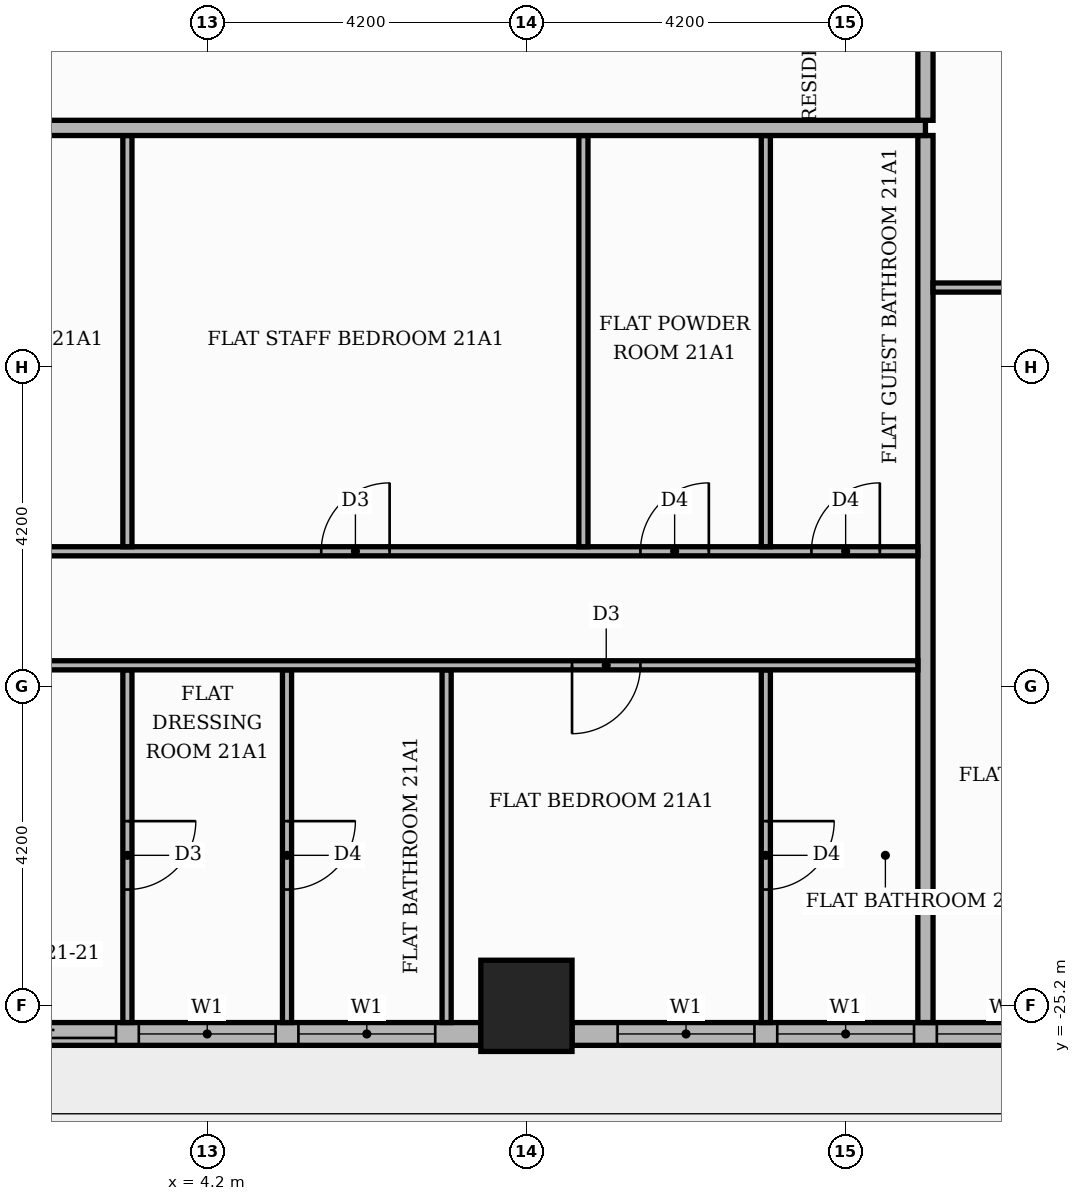
"""IFC4 building model, lengths in metres.
Left out: names, types, materials, properties, quantities, classifications, styles, units other than length and angle.
Written with IfcOpenShell. Run it as: python <this file> out.ifc"""

import sys

from ifc_helpers import new_model, si_unit, direction, frame, frame_2d, origin, origin_2d, place, context, subcontext, project, spatial, rectangle, extrude, element, fill, save


model = new_model("IFC4")
c1 = context("Model", 3, precision=1e-05, world=origin(), true_north=direction((0.0, 1.0)))
c2 = subcontext(c1, "Body", "Model", "MODEL_VIEW")
j1 = project(units=[si_unit("LENGTHUNIT", "METRE"), si_unit("PLANEANGLEUNIT", "RADIAN")], contexts=[c1])
p1 = place(None, origin())
s1 = spatial("IfcSite", under=j1, at=p1, CompositionType="ELEMENT")
p2 = place(p1, origin())
s2 = spatial("IfcBuilding", under=s1, at=p2, CompositionType="ELEMENT")
p3 = place(p2, frame((0.0, 0.0, 90.9)))
s3 = spatial("IfcBuildingStorey", under=s2, at=p3, CompositionType="ELEMENT", Elevation=90.9)
p4 = place(p3, frame((8.4, -25.2, 0.0), z_axis=(0.0, 0.0, 1.0), x_axis=(1.0, 0.0, 0.0)))
e1 = element("IfcColumn", 1, at=p4, inside=s3, PredefinedType="COLUMN", context=c2, shape_type="SweptSolid", body=[
    extrude(rectangle(XDim=1.2, YDim=1.2, at=origin_2d()), origin(), (0.0, 0.0, 1.0), 3.9),
])
p5 = place(p3, frame((0.6, -25.57, 0.0), z_axis=(0.0, 0.0, 1.0), x_axis=(1.0, 0.0, 0.0)))
e2 = element("IfcWall", 2, at=p5, inside=s3, PredefinedType="STANDARD", context=c2, shape_type="SweptSolid", body=[
    extrude(rectangle(XDim=7.2, YDim=0.3, at=frame_2d((3.6, 0.0))), origin(), (0.0, 0.0, 1.0), 3.48),
])
p6 = place(p5, frame((0.6, 0.0, 0.0)))
e3 = element("IfcOpeningElement", 3, at=p6, cuts=e2, PredefinedType="OPENING", context=c2, shape_type="SweptSolid", body=[
    extrude(rectangle(XDim=1.8, YDim=2.4, at=frame_2d((0.9, 1.2))), frame((0.0, 0.16, 0.0), z_axis=(0.0, -1.0, 0.0), x_axis=(1.0, 0.0, 0.0)), (0.0, 0.0, 1.0), 0.32),
])
p7 = place(p5, frame((2.7, 0.0, 0.9)))
e4 = element("IfcOpeningElement", 4, at=p7, cuts=e2, PredefinedType="OPENING", context=c2, shape_type="SweptSolid", body=[
    extrude(rectangle(XDim=1.8, YDim=2.1, at=frame_2d((0.9, 1.05))), frame((0.0, 0.16, 0.0), z_axis=(0.0, -1.0, 0.0), x_axis=(1.0, 0.0, 0.0)), (0.0, 0.0, 1.0), 0.32),
])
p8 = place(p5, frame((4.8, 0.0, 0.9)))
e5 = element("IfcOpeningElement", 5, at=p8, cuts=e2, PredefinedType="OPENING", context=c2, shape_type="SweptSolid", body=[
    extrude(rectangle(XDim=1.8, YDim=2.1, at=frame_2d((0.9, 1.05))), frame((0.0, 0.16, 0.0), z_axis=(0.0, -1.0, 0.0), x_axis=(1.0, 0.0, 0.0)), (0.0, 0.0, 1.0), 0.32),
])
p9 = place(p3, frame((9.0, -25.57, 0.0), z_axis=(0.0, 0.0, 1.0), x_axis=(1.0, 0.0, 0.0)))
e6 = element("IfcWall", 6, at=p9, inside=s3, PredefinedType="STANDARD", context=c2, shape_type="SweptSolid", body=[
    extrude(rectangle(XDim=7.2, YDim=0.3, at=frame_2d((3.6, 0.0))), origin(), (0.0, 0.0, 1.0), 3.48),
])
p10 = place(p9, frame((0.6, 0.0, 0.9)))
e7 = element("IfcOpeningElement", 7, at=p10, cuts=e6, PredefinedType="OPENING", context=c2, shape_type="SweptSolid", body=[
    extrude(rectangle(XDim=1.8, YDim=2.1, at=frame_2d((0.9, 1.05))), frame((0.0, 0.16, 0.0), z_axis=(0.0, -1.0, 0.0), x_axis=(1.0, 0.0, 0.0)), (0.0, 0.0, 1.0), 0.32),
])
p11 = place(p9, frame((2.7, 0.0, 0.9)))
e8 = element("IfcOpeningElement", 8, at=p11, cuts=e6, PredefinedType="OPENING", context=c2, shape_type="SweptSolid", body=[
    extrude(rectangle(XDim=1.8, YDim=2.1, at=frame_2d((0.9, 1.05))), frame((0.0, 0.16, 0.0), z_axis=(0.0, -1.0, 0.0), x_axis=(1.0, 0.0, 0.0)), (0.0, 0.0, 1.0), 0.32),
])
p12 = place(p9, frame((4.8, 0.0, 0.9)))
e9 = element("IfcOpeningElement", 9, at=p12, cuts=e6, PredefinedType="OPENING", context=c2, shape_type="SweptSolid", body=[
    extrude(rectangle(XDim=1.8, YDim=2.1, at=frame_2d((0.9, 1.05))), frame((0.0, 0.16, 0.0), z_axis=(0.0, -1.0, 0.0), x_axis=(1.0, 0.0, 0.0)), (0.0, 0.0, 1.0), 0.32),
])
p13 = place(p3, frame((3.15, -25.42, 0.0), z_axis=(0.0, 0.0, 1.0), x_axis=(0.0, 1.0, 0.0)))
e10 = element("IfcWall", 10, at=p13, inside=s3, PredefinedType="PARTITIONING", context=c2, shape_type="SweptSolid", body=[
    extrude(rectangle(XDim=4.64, YDim=0.12, at=frame_2d((2.32, 0.0))), origin(), (0.0, 0.0, 1.0), 3.48),
])
p14 = place(p13, frame((1.75, 0.0, 0.0)))
e11 = element("IfcOpeningElement", 11, at=p14, cuts=e10, PredefinedType="OPENING", context=c2, shape_type="SweptSolid", body=[
    extrude(rectangle(XDim=0.9, YDim=2.1, at=frame_2d((0.45, 1.05))), frame((0.0, 0.07, 0.0), z_axis=(0.0, -1.0, 0.0), x_axis=(1.0, 0.0, 0.0)), (0.0, 0.0, 1.0), 0.14),
])
p15 = place(p3, frame((5.25, -25.42, 0.0), z_axis=(0.0, 0.0, 1.0), x_axis=(0.0, 1.0, 0.0)))
e12 = element("IfcWall", 12, at=p15, inside=s3, PredefinedType="PARTITIONING", context=c2, shape_type="SweptSolid", body=[
    extrude(rectangle(XDim=4.64, YDim=0.12, at=frame_2d((2.32, 0.0))), origin(), (0.0, 0.0, 1.0), 3.48),
])
p16 = place(p15, frame((1.75, 0.0, 0.0)))
e13 = element("IfcOpeningElement", 13, at=p16, cuts=e12, PredefinedType="OPENING", context=c2, shape_type="SweptSolid", body=[
    extrude(rectangle(XDim=0.9, YDim=2.1, at=frame_2d((0.45, 1.05))), frame((0.0, 0.07, 0.0), z_axis=(0.0, -1.0, 0.0), x_axis=(1.0, 0.0, 0.0)), (0.0, 0.0, 1.0), 0.14),
])
p17 = place(p3, frame((7.35, -25.42, 0.0), z_axis=(0.0, 0.0, 1.0), x_axis=(0.0, 1.0, 0.0)))
e14 = element("IfcWall", 14, at=p17, inside=s3, PredefinedType="PARTITIONING", context=c2, shape_type="SweptSolid", body=[
    extrude(rectangle(XDim=4.64, YDim=0.12, at=frame_2d((2.32, 0.0))), origin(), (0.0, 0.0, 1.0), 3.48),
])
p18 = place(p3, frame((11.55, -25.42, 0.0), z_axis=(0.0, 0.0, 1.0), x_axis=(0.0, 1.0, 0.0)))
e15 = element("IfcWall", 15, at=p18, inside=s3, PredefinedType="PARTITIONING", context=c2, shape_type="SweptSolid", body=[
    extrude(rectangle(XDim=4.64, YDim=0.12, at=frame_2d((2.32, 0.0))), origin(), (0.0, 0.0, 1.0), 3.48),
])
p19 = place(p18, frame((1.75, 0.0, 0.0)))
e16 = element("IfcOpeningElement", 16, at=p19, cuts=e15, PredefinedType="OPENING", context=c2, shape_type="SweptSolid", body=[
    extrude(rectangle(XDim=0.9, YDim=2.1, at=frame_2d((0.45, 1.05))), frame((0.0, 0.07, 0.0), z_axis=(0.0, -1.0, 0.0), x_axis=(1.0, 0.0, 0.0)), (0.0, 0.0, 1.0), 0.14),
])
p20 = place(p3, frame((13.65, -25.42, 0.0), z_axis=(0.0, 0.0, 1.0), x_axis=(0.0, 1.0, 0.0)))
e17 = element("IfcWall", 17, at=p20, inside=s3, PredefinedType="PARTITIONING", context=c2, shape_type="SweptSolid", body=[
    extrude(rectangle(XDim=11.67, YDim=0.2, at=frame_2d((5.835, 0.0))), origin(), (0.0, 0.0, 1.0), 3.48),
])
p21 = place(p3, frame((-25.42, -20.72, 0.0), z_axis=(0.0, 0.0, 1.0), x_axis=(1.0, 0.0, 0.0)))
e18 = element("IfcWall", 18, at=p21, inside=s3, PredefinedType="PARTITIONING", context=c2, shape_type="SweptSolid", body=[
    extrude(rectangle(XDim=38.97, YDim=0.12, at=frame_2d((19.485, 0.0))), origin(), (0.0, 0.0, 1.0), 3.48),
])
p22 = place(p21, frame((12.32, 0.0, 0.0)))
e19 = element("IfcOpeningElement", 19, at=p22, cuts=e18, PredefinedType="OPENING", context=c2, shape_type="SweptSolid", body=[
    extrude(rectangle(XDim=1.0, YDim=2.1, at=frame_2d((0.5, 1.05))), frame((0.0, 0.07, 0.0), z_axis=(0.0, -1.0, 0.0), x_axis=(1.0, 0.0, 0.0)), (0.0, 0.0, 1.0), 0.14),
])
p23 = place(p21, frame((16.52, 0.0, 0.0)))
e20 = element("IfcOpeningElement", 20, at=p23, cuts=e18, PredefinedType="OPENING", context=c2, shape_type="SweptSolid", body=[
    extrude(rectangle(XDim=1.0, YDim=2.1, at=frame_2d((0.5, 1.05))), frame((0.0, 0.07, 0.0), z_axis=(0.0, -1.0, 0.0), x_axis=(1.0, 0.0, 0.0)), (0.0, 0.0, 1.0), 0.14),
])
p24 = place(p21, frame((23.92, 0.0, 0.0)))
e21 = element("IfcOpeningElement", 21, at=p24, cuts=e18, PredefinedType="OPENING", context=c2, shape_type="SweptSolid", body=[
    extrude(rectangle(XDim=0.9, YDim=2.1, at=frame_2d((0.45, 1.05))), frame((0.0, 0.07, 0.0), z_axis=(0.0, -1.0, 0.0), x_axis=(1.0, 0.0, 0.0)), (0.0, 0.0, 1.0), 0.14),
])
p25 = place(p21, frame((34.42, 0.0, 0.0)))
e22 = element("IfcOpeningElement", 22, at=p25, cuts=e18, PredefinedType="OPENING", context=c2, shape_type="SweptSolid", body=[
    extrude(rectangle(XDim=0.9, YDim=2.1, at=frame_2d((0.45, 1.05))), frame((0.0, 0.07, 0.0), z_axis=(0.0, -1.0, 0.0), x_axis=(1.0, 0.0, 0.0)), (0.0, 0.0, 1.0), 0.14),
])
p26 = place(p3, frame((-7.35, -19.22, 0.0), z_axis=(0.0, 0.0, 1.0), x_axis=(1.0, 0.0, 0.0)))
e23 = element("IfcWall", 23, at=p26, inside=s3, PredefinedType="PARTITIONING", context=c2, shape_type="SweptSolid", body=[
    extrude(rectangle(XDim=20.9, YDim=0.12, at=frame_2d((10.45, 0.0))), origin(), (0.0, 0.0, 1.0), 3.48),
])
p27 = place(p26, frame((2.7, 0.0, 0.0)))
e24 = element("IfcOpeningElement", 24, at=p27, cuts=e23, PredefinedType="OPENING", context=c2, shape_type="SweptSolid", body=[
    extrude(rectangle(XDim=0.9, YDim=2.1, at=frame_2d((0.45, 1.05))), frame((0.0, 0.07, 0.0), z_axis=(0.0, -1.0, 0.0), x_axis=(1.0, 0.0, 0.0)), (0.0, 0.0, 1.0), 0.14),
])
p28 = place(p26, frame((7.95, 0.0, 0.0)))
e25 = element("IfcOpeningElement", 25, at=p28, cuts=e23, PredefinedType="OPENING", context=c2, shape_type="SweptSolid", body=[
    extrude(rectangle(XDim=0.9, YDim=2.1, at=frame_2d((0.45, 1.05))), frame((0.0, 0.07, 0.0), z_axis=(0.0, -1.0, 0.0), x_axis=(1.0, 0.0, 0.0)), (0.0, 0.0, 1.0), 0.14),
])
p29 = place(p26, frame((13.05, 0.0, 0.0)))
e26 = element("IfcOpeningElement", 26, at=p29, cuts=e23, PredefinedType="OPENING", context=c2, shape_type="SweptSolid", body=[
    extrude(rectangle(XDim=0.9, YDim=2.1, at=frame_2d((0.45, 1.05))), frame((0.0, 0.07, 0.0), z_axis=(0.0, -1.0, 0.0), x_axis=(1.0, 0.0, 0.0)), (0.0, 0.0, 1.0), 0.14),
])
p30 = place(p26, frame((17.25, 0.0, 0.0)))
e27 = element("IfcOpeningElement", 27, at=p30, cuts=e23, PredefinedType="OPENING", context=c2, shape_type="SweptSolid", body=[
    extrude(rectangle(XDim=0.9, YDim=2.1, at=frame_2d((0.45, 1.05))), frame((0.0, 0.07, 0.0), z_axis=(0.0, -1.0, 0.0), x_axis=(1.0, 0.0, 0.0)), (0.0, 0.0, 1.0), 0.14),
])
p31 = place(p26, frame((19.5, 0.0, 0.0)))
e28 = element("IfcOpeningElement", 28, at=p31, cuts=e23, PredefinedType="OPENING", context=c2, shape_type="SweptSolid", body=[
    extrude(rectangle(XDim=0.9, YDim=2.1, at=frame_2d((0.45, 1.05))), frame((0.0, 0.07, 0.0), z_axis=(0.0, -1.0, 0.0), x_axis=(1.0, 0.0, 0.0)), (0.0, 0.0, 1.0), 0.14),
])
for number, where, z_axis, x_axis in (
    (29, (3.15, -19.16, 0.0), (0.0, 0.0, 1.0), (0.0, 1.0, 0.0)),
    (30, (9.15, -19.16, 0.0), (0.0, 0.0, 1.0), (0.0, 1.0, 0.0)),
    (31, (11.55, -19.16, 0.0), (0.0, 0.0, 1.0), (0.0, 1.0, 0.0)),
):
    element("IfcWall", number, at=place(p3, frame(where, z_axis=z_axis, x_axis=x_axis)), inside=s3, PredefinedType="PARTITIONING", context=c2, shape_type="SweptSolid", body=[
        extrude(rectangle(XDim=5.41, YDim=0.12, at=frame_2d((2.705, 0.0))), origin(), (0.0, 0.0, 1.0), 3.48),
    ])
p32 = place(p3, frame((13.75, -15.75, 0.0), z_axis=(0.0, 0.0, 1.0), x_axis=(1.0, 0.0, 0.0)))
e32 = element("IfcWall", 32, at=p32, inside=s3, PredefinedType="PARTITIONING", context=c2, shape_type="SweptSolid", body=[
    extrude(rectangle(XDim=6.67, YDim=0.12, at=frame_2d((3.335, 0.0))), origin(), (0.0, 0.0, 1.0), 3.48),
])
p33 = place(p32, frame((2.785, 0.0, 0.0)))
e33 = element("IfcOpeningElement", 33, at=p33, cuts=e32, PredefinedType="OPENING", context=c2, shape_type="SweptSolid", body=[
    extrude(rectangle(XDim=1.0, YDim=2.1, at=frame_2d((0.5, 1.05))), frame((0.0, 0.07, 0.0), z_axis=(0.0, -1.0, 0.0), x_axis=(1.0, 0.0, 0.0)), (0.0, 0.0, 1.0), 0.14),
])
p34 = place(p3, frame((-25.42, -13.65, 0.0), z_axis=(0.0, 0.0, 1.0), x_axis=(1.0, 0.0, 0.0)))
e34 = element("IfcWall", 34, at=p34, inside=s3, PredefinedType="PARTITIONING", context=c2, shape_type="SweptSolid", body=[
    extrude(rectangle(XDim=39.07, YDim=0.2, at=frame_2d((19.535, 0.0))), origin(), (0.0, 0.0, 1.0), 3.48),
])
p35 = place(p34, frame((14.37, 0.0, 0.0)))
e35 = element("IfcOpeningElement", 35, at=p35, cuts=e34, PredefinedType="OPENING", context=c2, shape_type="SweptSolid", body=[
    extrude(rectangle(XDim=1.1, YDim=2.4, at=frame_2d((0.55, 1.2))), frame((0.0, 0.11, 0.0), z_axis=(0.0, -1.0, 0.0), x_axis=(1.0, 0.0, 0.0)), (0.0, 0.0, 1.0), 0.22),
])
p36 = place(p3, frame((13.65, -13.55, 0.0), z_axis=(0.0, 0.0, 1.0), x_axis=(0.0, 1.0, 0.0)))
e36 = element("IfcWall", 36, at=p36, inside=s3, PredefinedType="PARTITIONING", context=c2, shape_type="SweptSolid", body=[
    extrude(rectangle(XDim=8.2, YDim=0.2, at=frame_2d((4.1, 0.0))), origin(), (0.0, 0.0, 1.0), 3.48),
])
p37 = place(p36, frame((1.45, 0.0, 0.0)))
e37 = element("IfcOpeningElement", 37, at=p37, cuts=e36, PredefinedType="OPENING", context=c2, shape_type="SweptSolid", body=[
    extrude(rectangle(XDim=1.1, YDim=2.4, at=frame_2d((0.55, 1.2))), frame((0.0, 0.11, 0.0), z_axis=(0.0, -1.0, 0.0), x_axis=(1.0, 0.0, 0.0)), (0.0, 0.0, 1.0), 0.22),
])
p38 = place(p6, origin())
e38 = element("IfcDoor", 38, at=p38, inside=s3, OperationType="SLIDING_TO_LEFT", PredefinedType="DOOR", context=c2, shape_type="SweptSolid", body=[
    extrude(rectangle(XDim=1.8, YDim=2.4, at=frame_2d((0.9, 1.2))), frame((0.0, 0.025, 0.0), z_axis=(0.0, -1.0, 0.0), x_axis=(1.0, 0.0, 0.0)), (0.0, 0.0, 1.0), 0.05),
])
fill(e3, e38)
p39 = place(p7, origin())
e39 = element("IfcWindow", 39, at=p39, inside=s3, PartitioningType="SINGLE_PANEL", PredefinedType="WINDOW", context=c2, shape_type="SweptSolid", body=[
    extrude(rectangle(XDim=1.8, YDim=2.1, at=frame_2d((0.9, 1.05))), frame((0.0, 0.03, 0.0), z_axis=(0.0, -1.0, 0.0), x_axis=(1.0, 0.0, 0.0)), (0.0, 0.0, 1.0), 0.06),
])
fill(e4, e39)
p40 = place(p8, origin())
e40 = element("IfcWindow", 40, at=p40, inside=s3, PartitioningType="SINGLE_PANEL", PredefinedType="WINDOW", context=c2, shape_type="SweptSolid", body=[
    extrude(rectangle(XDim=1.8, YDim=2.1, at=frame_2d((0.9, 1.05))), frame((0.0, 0.03, 0.0), z_axis=(0.0, -1.0, 0.0), x_axis=(1.0, 0.0, 0.0)), (0.0, 0.0, 1.0), 0.06),
])
fill(e5, e40)
p41 = place(p10, origin())
e41 = element("IfcWindow", 41, at=p41, inside=s3, PartitioningType="SINGLE_PANEL", PredefinedType="WINDOW", context=c2, shape_type="SweptSolid", body=[
    extrude(rectangle(XDim=1.8, YDim=2.1, at=frame_2d((0.9, 1.05))), frame((0.0, 0.03, 0.0), z_axis=(0.0, -1.0, 0.0), x_axis=(1.0, 0.0, 0.0)), (0.0, 0.0, 1.0), 0.06),
])
fill(e7, e41)
p42 = place(p11, origin())
e42 = element("IfcWindow", 42, at=p42, inside=s3, PartitioningType="SINGLE_PANEL", PredefinedType="WINDOW", context=c2, shape_type="SweptSolid", body=[
    extrude(rectangle(XDim=1.8, YDim=2.1, at=frame_2d((0.9, 1.05))), frame((0.0, 0.03, 0.0), z_axis=(0.0, -1.0, 0.0), x_axis=(1.0, 0.0, 0.0)), (0.0, 0.0, 1.0), 0.06),
])
fill(e8, e42)
p43 = place(p12, origin())
e43 = element("IfcWindow", 43, at=p43, inside=s3, PartitioningType="SINGLE_PANEL", PredefinedType="WINDOW", context=c2, shape_type="SweptSolid", body=[
    extrude(rectangle(XDim=1.8, YDim=2.1, at=frame_2d((0.9, 1.05))), frame((0.0, 0.03, 0.0), z_axis=(0.0, -1.0, 0.0), x_axis=(1.0, 0.0, 0.0)), (0.0, 0.0, 1.0), 0.06),
])
fill(e9, e43)
p44 = place(p29, origin())
e44 = element("IfcDoor", 44, at=p44, inside=s3, OperationType="SINGLE_SWING_RIGHT", PredefinedType="DOOR", context=c2, shape_type="SweptSolid", body=[
    extrude(rectangle(XDim=0.9, YDim=2.1, at=frame_2d((0.45, 1.05))), frame((0.0, 0.025, 0.0), z_axis=(0.0, -1.0, 0.0), x_axis=(1.0, 0.0, 0.0)), (0.0, 0.0, 1.0), 0.05),
])
fill(e26, e44)
p45 = place(p30, origin())
e45 = element("IfcDoor", 45, at=p45, inside=s3, OperationType="SINGLE_SWING_RIGHT", PredefinedType="DOOR", context=c2, shape_type="SweptSolid", body=[
    extrude(rectangle(XDim=0.9, YDim=2.1, at=frame_2d((0.45, 1.05))), frame((0.0, 0.025, 0.0), z_axis=(0.0, -1.0, 0.0), x_axis=(1.0, 0.0, 0.0)), (0.0, 0.0, 1.0), 0.05),
])
fill(e27, e45)
p46 = place(p31, origin())
e46 = element("IfcDoor", 46, at=p46, inside=s3, OperationType="SINGLE_SWING_RIGHT", PredefinedType="DOOR", context=c2, shape_type="SweptSolid", body=[
    extrude(rectangle(XDim=0.9, YDim=2.1, at=frame_2d((0.45, 1.05))), frame((0.0, 0.025, 0.0), z_axis=(0.0, -1.0, 0.0), x_axis=(1.0, 0.0, 0.0)), (0.0, 0.0, 1.0), 0.05),
])
fill(e28, e46)
p47 = place(p14, frame((0.9, 0.0, 0.0), z_axis=(0.0, 0.0, 1.0), x_axis=(-1.0, 0.0, 0.0)))
e47 = element("IfcDoor", 47, at=p47, inside=s3, OperationType="SINGLE_SWING_RIGHT", PredefinedType="DOOR", context=c2, shape_type="SweptSolid", body=[
    extrude(rectangle(XDim=0.9, YDim=2.1, at=frame_2d((0.45, 1.05))), frame((0.0, 0.025, 0.0), z_axis=(0.0, -1.0, 0.0), x_axis=(1.0, 0.0, 0.0)), (0.0, 0.0, 1.0), 0.05),
])
fill(e11, e47)
p48 = place(p16, frame((0.9, 0.0, 0.0), z_axis=(0.0, 0.0, 1.0), x_axis=(-1.0, 0.0, 0.0)))
e48 = element("IfcDoor", 48, at=p48, inside=s3, OperationType="SINGLE_SWING_RIGHT", PredefinedType="DOOR", context=c2, shape_type="SweptSolid", body=[
    extrude(rectangle(XDim=0.9, YDim=2.1, at=frame_2d((0.45, 1.05))), frame((0.0, 0.025, 0.0), z_axis=(0.0, -1.0, 0.0), x_axis=(1.0, 0.0, 0.0)), (0.0, 0.0, 1.0), 0.05),
])
fill(e13, e48)
p49 = place(p25, frame((0.9, 0.0, 0.0), z_axis=(0.0, 0.0, 1.0), x_axis=(-1.0, 0.0, 0.0)))
e49 = element("IfcDoor", 49, at=p49, inside=s3, OperationType="SINGLE_SWING_LEFT", PredefinedType="DOOR", context=c2, shape_type="SweptSolid", body=[
    extrude(rectangle(XDim=0.9, YDim=2.1, at=frame_2d((0.45, 1.05))), frame((0.0, 0.025, 0.0), z_axis=(0.0, -1.0, 0.0), x_axis=(1.0, 0.0, 0.0)), (0.0, 0.0, 1.0), 0.05),
])
fill(e22, e49)
p50 = place(p19, frame((0.9, 0.0, 0.0), z_axis=(0.0, 0.0, 1.0), x_axis=(-1.0, 0.0, 0.0)))
e50 = element("IfcDoor", 50, at=p50, inside=s3, OperationType="SINGLE_SWING_RIGHT", PredefinedType="DOOR", context=c2, shape_type="SweptSolid", body=[
    extrude(rectangle(XDim=0.9, YDim=2.1, at=frame_2d((0.45, 1.05))), frame((0.0, 0.025, 0.0), z_axis=(0.0, -1.0, 0.0), x_axis=(1.0, 0.0, 0.0)), (0.0, 0.0, 1.0), 0.05),
])
fill(e16, e50)
save(model, sys.argv[1])
